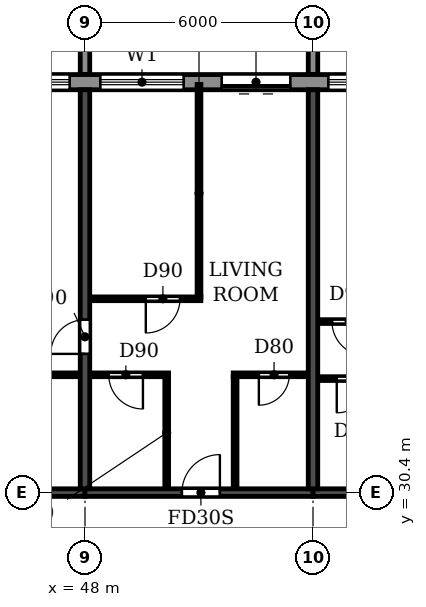
"""IFC4 building model, lengths in metres.
Left out: names, types, materials, properties, quantities, classifications, styles, units other than length and angle.
Written with IfcOpenShell. Run it as: python <this file> out.ifc"""

import sys

from ifc_helpers import new_model, si_unit, direction, frame, frame_2d, origin, place, context, subcontext, project, spatial, polyline, rectangle, outline, extrude, source, transform, mapped, element, fill, save


model = new_model("IFC4")
c1 = context("Model", 3, precision=1e-05, world=origin(), true_north=direction((0.0, 1.0)))
c2 = subcontext(c1, "Body", "Model", "MODEL_VIEW")
j1 = project(units=[si_unit("LENGTHUNIT", "METRE"), si_unit("PLANEANGLEUNIT", "RADIAN")], contexts=[c1])
p1 = place(None, origin())
s1 = spatial("IfcSite", under=j1, at=p1, CompositionType="ELEMENT")
p2 = place(p1, origin())
s2 = spatial("IfcBuilding", under=s1, at=p2, CompositionType="ELEMENT")
p3 = place(p2, frame((0.0, 0.0, 171.9)))
s3 = spatial("IfcBuildingStorey", under=s2, at=p3, CompositionType="ELEMENT", Elevation=171.9)
p4 = place(p3, frame((48.0, 30.5, 0.0), z_axis=(0.0, 0.0, 1.0), x_axis=(0.0, 1.0, 0.0)))
e1 = element("IfcWall", 1, at=p4, inside=s3, PredefinedType="SHEAR", context=c2, shape_type="SweptSolid", body=[
    extrude(rectangle(XDim=10.5, YDim=0.25, at=frame_2d((5.25, 0.0))), origin(), (0.0, 0.0, 1.0), 3.08),
])
p5 = place(p4, frame((3.55, 0.0, 0.0)))
e2 = element("IfcOpeningElement", 2, at=p5, cuts=e1, PredefinedType="OPENING", context=c2, shape_type="SweptSolid", body=[
    extrude(rectangle(XDim=0.9, YDim=2.1, at=frame_2d((0.45, 1.05))), frame((0.0, 0.135, 0.0), z_axis=(0.0, -1.0, 0.0), x_axis=(1.0, 0.0, 0.0)), (0.0, 0.0, 1.0), 0.27),
])
p6 = place(p3, frame((54.0, 30.5, 0.0), z_axis=(0.0, 0.0, 1.0), x_axis=(0.0, 1.0, 0.0)))
e3 = element("IfcWall", 3, at=p6, inside=s3, PredefinedType="SHEAR", context=c2, shape_type="SweptSolid", body=[
    extrude(rectangle(XDim=10.5, YDim=0.25, at=frame_2d((5.25, 0.0))), origin(), (0.0, 0.0, 1.0), 3.08),
])
p7 = place(p3, frame((42.0, 30.4, 0.0), z_axis=(0.0, 0.0, 1.0), x_axis=(1.0, 0.0, 0.0)))
e4 = element("IfcWall", 4, at=p7, inside=s3, PredefinedType="SHEAR", context=c2, shape_type="SweptSolid", body=[
    extrude(rectangle(XDim=6.0, YDim=0.2, at=frame_2d((3.0, 0.0))), origin(), (0.0, 0.0, 1.0), 2.48),
])
p8 = place(p3, frame((48.0, 30.4, 0.0), z_axis=(0.0, 0.0, 1.0), x_axis=(1.0, 0.0, 0.0)))
e5 = element("IfcWall", 5, at=p8, inside=s3, PredefinedType="SHEAR", context=c2, shape_type="SweptSolid", body=[
    extrude(rectangle(XDim=6.0, YDim=0.2, at=frame_2d((3.0, 0.0))), origin(), (0.0, 0.0, 1.0), 2.48),
])
p9 = place(p8, frame((2.55, 0.0, 0.0)))
e6 = element("IfcOpeningElement", 6, at=p9, cuts=e5, PredefinedType="OPENING", context=c2, shape_type="SweptSolid", body=[
    extrude(rectangle(XDim=1.0, YDim=2.1, at=frame_2d((0.5, 1.05))), frame((0.0, 0.11, 0.0), z_axis=(0.0, -1.0, 0.0), x_axis=(1.0, 0.0, 0.0)), (0.0, 0.0, 1.0), 0.22),
])
p10 = place(p3, frame((54.0, 30.4, 0.0), z_axis=(0.0, 0.0, 1.0), x_axis=(1.0, 0.0, 0.0)))
e7 = element("IfcWall", 7, at=p10, inside=s3, PredefinedType="SHEAR", context=c2, shape_type="SweptSolid", body=[
    extrude(rectangle(XDim=6.0, YDim=0.2, at=frame_2d((3.0, 0.0))), origin(), (0.0, 0.0, 1.0), 2.48),
])
p11 = place(p10, frame((2.55, 0.0, 0.0)))
e8 = element("IfcOpeningElement", 8, at=p11, cuts=e7, PredefinedType="OPENING", context=c2, shape_type="SweptSolid", body=[
    extrude(rectangle(XDim=1.0, YDim=2.1, at=frame_2d((0.5, 1.05))), frame((0.0, 0.11, 0.0), z_axis=(0.0, -1.0, 0.0), x_axis=(1.0, 0.0, 0.0)), (0.0, 0.0, 1.0), 0.22),
])
p12 = place(p3, frame((79.317, 41.2, 0.0), z_axis=(0.0, 0.0, 1.0), x_axis=(-1.0, 0.0, 0.0)))
e9 = element("IfcWall", 9, at=p12, inside=s3, PredefinedType="STANDARD", context=c2, shape_type="SweptSolid", body=[
    extrude(rectangle(XDim=56.634, YDim=0.4, at=frame_2d((28.317, 0.0))), origin(), (0.0, 0.0, 1.0), 3.08),
])
p13 = place(p12, frame((52.717, 0.0, 0.9)))
e10 = element("IfcOpeningElement", 10, at=p13, cuts=e9, PredefinedType="OPENING", context=c2, shape_type="SweptSolid", body=[
    extrude(rectangle(XDim=2.2, YDim=1.5, at=frame_2d((1.1, 0.75))), frame((0.0, 0.21, 0.0), z_axis=(0.0, -1.0, 0.0), x_axis=(1.0, 0.0, 0.0)), (0.0, 0.0, 1.0), 0.42),
])
p14 = place(p12, frame((49.917, 0.0, 0.0)))
e11 = element("IfcOpeningElement", 11, at=p14, cuts=e9, PredefinedType="OPENING", context=c2, shape_type="SweptSolid", body=[
    extrude(rectangle(XDim=1.8, YDim=2.4, at=frame_2d((0.9, 1.2))), frame((0.0, 0.21, 0.0), z_axis=(0.0, -1.0, 0.0), x_axis=(1.0, 0.0, 0.0)), (0.0, 0.0, 1.0), 0.42),
])
p15 = place(p12, frame((46.717, 0.0, 0.9)))
e12 = element("IfcOpeningElement", 12, at=p15, cuts=e9, PredefinedType="OPENING", context=c2, shape_type="SweptSolid", body=[
    extrude(rectangle(XDim=2.2, YDim=1.5, at=frame_2d((1.1, 0.75))), frame((0.0, 0.21, 0.0), z_axis=(0.0, -1.0, 0.0), x_axis=(1.0, 0.0, 0.0)), (0.0, 0.0, 1.0), 0.42),
])
p16 = place(p12, frame((43.717, 0.0, 0.9)))
e13 = element("IfcOpeningElement", 13, at=p16, cuts=e9, PredefinedType="OPENING", context=c2, shape_type="SweptSolid", body=[
    extrude(rectangle(XDim=2.2, YDim=1.5, at=frame_2d((1.1, 0.75))), frame((0.0, 0.21, 0.0), z_axis=(0.0, -1.0, 0.0), x_axis=(1.0, 0.0, 0.0)), (0.0, 0.0, 1.0), 0.42),
])
p17 = place(p12, frame((40.917, 0.0, 0.0)))
e14 = element("IfcOpeningElement", 14, at=p17, cuts=e9, PredefinedType="OPENING", context=c2, shape_type="SweptSolid", body=[
    extrude(rectangle(XDim=1.8, YDim=2.4, at=frame_2d((0.9, 1.2))), frame((0.0, 0.21, 0.0), z_axis=(0.0, -1.0, 0.0), x_axis=(1.0, 0.0, 0.0)), (0.0, 0.0, 1.0), 0.42),
])
p18 = place(p12, frame((37.717, 0.0, 0.9)))
e15 = element("IfcOpeningElement", 15, at=p18, cuts=e9, PredefinedType="OPENING", context=c2, shape_type="SweptSolid", body=[
    extrude(rectangle(XDim=2.2, YDim=1.5, at=frame_2d((1.1, 0.75))), frame((0.0, 0.21, 0.0), z_axis=(0.0, -1.0, 0.0), x_axis=(1.0, 0.0, 0.0)), (0.0, 0.0, 1.0), 0.42),
])
p19 = place(p12, frame((34.717, 0.0, 0.9)))
e16 = element("IfcOpeningElement", 16, at=p19, cuts=e9, PredefinedType="OPENING", context=c2, shape_type="SweptSolid", body=[
    extrude(rectangle(XDim=2.2, YDim=1.5, at=frame_2d((1.1, 0.75))), frame((0.0, 0.21, 0.0), z_axis=(0.0, -1.0, 0.0), x_axis=(1.0, 0.0, 0.0)), (0.0, 0.0, 1.0), 0.42),
])
p20 = place(p12, frame((31.717, 0.0, 0.9)))
e17 = element("IfcOpeningElement", 17, at=p20, cuts=e9, PredefinedType="OPENING", context=c2, shape_type="SweptSolid", body=[
    extrude(rectangle(XDim=2.2, YDim=1.5, at=frame_2d((1.1, 0.75))), frame((0.0, 0.21, 0.0), z_axis=(0.0, -1.0, 0.0), x_axis=(1.0, 0.0, 0.0)), (0.0, 0.0, 1.0), 0.42),
])
p21 = place(p12, frame((28.717, 0.0, 0.9)))
e18 = element("IfcOpeningElement", 18, at=p21, cuts=e9, PredefinedType="OPENING", context=c2, shape_type="SweptSolid", body=[
    extrude(rectangle(XDim=2.2, YDim=1.5, at=frame_2d((1.1, 0.75))), frame((0.0, 0.21, 0.0), z_axis=(0.0, -1.0, 0.0), x_axis=(1.0, 0.0, 0.0)), (0.0, 0.0, 1.0), 0.42),
])
p22 = place(p12, frame((25.917, 0.0, 0.0)))
e19 = element("IfcOpeningElement", 19, at=p22, cuts=e9, PredefinedType="OPENING", context=c2, shape_type="SweptSolid", body=[
    extrude(rectangle(XDim=1.8, YDim=2.4, at=frame_2d((0.9, 1.2))), frame((0.0, 0.21, 0.0), z_axis=(0.0, -1.0, 0.0), x_axis=(1.0, 0.0, 0.0)), (0.0, 0.0, 1.0), 0.42),
])
p23 = place(p12, frame((22.717, 0.0, 0.9)))
e20 = element("IfcOpeningElement", 20, at=p23, cuts=e9, PredefinedType="OPENING", context=c2, shape_type="SweptSolid", body=[
    extrude(rectangle(XDim=2.2, YDim=1.5, at=frame_2d((1.1, 0.75))), frame((0.0, 0.21, 0.0), z_axis=(0.0, -1.0, 0.0), x_axis=(1.0, 0.0, 0.0)), (0.0, 0.0, 1.0), 0.42),
])
p24 = place(p12, frame((19.917, 0.0, 0.0)))
e21 = element("IfcOpeningElement", 21, at=p24, cuts=e9, PredefinedType="OPENING", context=c2, shape_type="SweptSolid", body=[
    extrude(rectangle(XDim=1.8, YDim=2.4, at=frame_2d((0.9, 1.2))), frame((0.0, 0.21, 0.0), z_axis=(0.0, -1.0, 0.0), x_axis=(1.0, 0.0, 0.0)), (0.0, 0.0, 1.0), 0.42),
])
p25 = place(p12, frame((16.717, 0.0, 0.9)))
e22 = element("IfcOpeningElement", 22, at=p25, cuts=e9, PredefinedType="OPENING", context=c2, shape_type="SweptSolid", body=[
    extrude(rectangle(XDim=2.2, YDim=1.5, at=frame_2d((1.1, 0.75))), frame((0.0, 0.21, 0.0), z_axis=(0.0, -1.0, 0.0), x_axis=(1.0, 0.0, 0.0)), (0.0, 0.0, 1.0), 0.42),
])
p26 = place(p12, frame((13.717, 0.0, 0.9)))
e23 = element("IfcOpeningElement", 23, at=p26, cuts=e9, PredefinedType="OPENING", context=c2, shape_type="SweptSolid", body=[
    extrude(rectangle(XDim=2.2, YDim=1.5, at=frame_2d((1.1, 0.75))), frame((0.0, 0.21, 0.0), z_axis=(0.0, -1.0, 0.0), x_axis=(1.0, 0.0, 0.0)), (0.0, 0.0, 1.0), 0.42),
])
p27 = place(p12, frame((10.917, 0.0, 0.0)))
e24 = element("IfcOpeningElement", 24, at=p27, cuts=e9, PredefinedType="OPENING", context=c2, shape_type="SweptSolid", body=[
    extrude(rectangle(XDim=1.8, YDim=2.4, at=frame_2d((0.9, 1.2))), frame((0.0, 0.21, 0.0), z_axis=(0.0, -1.0, 0.0), x_axis=(1.0, 0.0, 0.0)), (0.0, 0.0, 1.0), 0.42),
])
p28 = place(p12, frame((7.717, 0.0, 0.9)))
e25 = element("IfcOpeningElement", 25, at=p28, cuts=e9, PredefinedType="OPENING", context=c2, shape_type="SweptSolid", body=[
    extrude(rectangle(XDim=2.2, YDim=1.5, at=frame_2d((1.1, 0.75))), frame((0.0, 0.21, 0.0), z_axis=(0.0, -1.0, 0.0), x_axis=(1.0, 0.0, 0.0)), (0.0, 0.0, 1.0), 0.42),
])
p29 = place(p12, frame((4.717, 0.0, 0.9)))
e26 = element("IfcOpeningElement", 26, at=p29, cuts=e9, PredefinedType="OPENING", context=c2, shape_type="SweptSolid", body=[
    extrude(rectangle(XDim=2.2, YDim=1.5, at=frame_2d((1.1, 0.75))), frame((0.0, 0.21, 0.0), z_axis=(0.0, -1.0, 0.0), x_axis=(1.0, 0.0, 0.0)), (0.0, 0.0, 1.0), 0.42),
])
p30 = place(p12, frame((1.917, 0.0, 0.0)))
e27 = element("IfcOpeningElement", 27, at=p30, cuts=e9, PredefinedType="OPENING", context=c2, shape_type="SweptSolid", body=[
    extrude(rectangle(XDim=1.8, YDim=2.4, at=frame_2d((0.9, 1.2))), frame((0.0, 0.21, 0.0), z_axis=(0.0, -1.0, 0.0), x_axis=(1.0, 0.0, 0.0)), (0.0, 0.0, 1.0), 0.42),
])
m1 = source(origin(), c2, "Body", "SweptSolid", [
    extrude(outline(polyline([(0.0, 0.0), (0.25, 0.0), (0.25, 3.1), (0.0, 3.1), (0.0, 0.0)])), origin(), (0.0, 0.0, 1.0), 3.1),
])
for number, where in (
    (28, (47.875, 41.4, 0.0)),
    (29, (53.875, 41.4, 0.0)),
):
    element("IfcWall", number, at=place(p3, frame(where)), inside=s3, PredefinedType="STANDARD", context=c2, shape_type="MappedRepresentation", body=[
        mapped(m1, transform((0.0, 0.0, 0.0))),
    ])
p31 = place(p3, frame((54.135, 33.4, 0.0), z_axis=(0.0, 0.0, 1.0), x_axis=(1.0, 0.0, 0.0)))
e30 = element("IfcWall", 30, at=p31, inside=s3, PredefinedType="PARTITIONING", context=c2, shape_type="SweptSolid", body=[
    extrude(rectangle(XDim=2.065, YDim=0.1, at=frame_2d((1.032, 0.0))), origin(), (0.0, 0.0, 1.0), 3.08),
])
p32 = place(p31, frame((0.49, 0.0, 0.0)))
e31 = element("IfcOpeningElement", 31, at=p32, cuts=e30, PredefinedType="OPENING", context=c2, shape_type="SweptSolid", body=[
    extrude(rectangle(XDim=0.9, YDim=2.1, at=frame_2d((0.45, 1.05))), frame((0.0, 0.06, 0.0), z_axis=(0.0, -1.0, 0.0), x_axis=(1.0, 0.0, 0.0)), (0.0, 0.0, 1.0), 0.12),
])
p33 = place(p3, frame((45.1, 33.5, 0.0), z_axis=(0.0, 0.0, 1.0), x_axis=(1.0, 0.0, 0.0)))
e32 = element("IfcWall", 32, at=p33, inside=s3, PredefinedType="PARTITIONING", context=c2, shape_type="SweptSolid", body=[
    extrude(rectangle(XDim=2.765, YDim=0.1, at=frame_2d((1.382, 0.0))), origin(), (0.0, 0.0, 1.0), 3.08),
])
p34 = place(p33, frame((1.0, 0.0, 0.0)))
e33 = element("IfcOpeningElement", 33, at=p34, cuts=e32, PredefinedType="OPENING", context=c2, shape_type="SweptSolid", body=[
    extrude(rectangle(XDim=0.8, YDim=2.1, at=frame_2d((0.4, 1.05))), frame((0.0, 0.06, 0.0), z_axis=(0.0, -1.0, 0.0), x_axis=(1.0, 0.0, 0.0)), (0.0, 0.0, 1.0), 0.12),
])
p35 = place(p3, frame((48.135, 33.5, 0.0), z_axis=(0.0, 0.0, 1.0), x_axis=(1.0, 0.0, 0.0)))
e34 = element("IfcWall", 34, at=p35, inside=s3, PredefinedType="PARTITIONING", context=c2, shape_type="SweptSolid", body=[
    extrude(rectangle(XDim=2.065, YDim=0.1, at=frame_2d((1.032, 0.0))), origin(), (0.0, 0.0, 1.0), 3.08),
])
p36 = place(p35, frame((0.49, 0.0, 0.0)))
e35 = element("IfcOpeningElement", 35, at=p36, cuts=e34, PredefinedType="OPENING", context=c2, shape_type="SweptSolid", body=[
    extrude(rectangle(XDim=0.9, YDim=2.1, at=frame_2d((0.45, 1.05))), frame((0.0, 0.06, 0.0), z_axis=(0.0, -1.0, 0.0), x_axis=(1.0, 0.0, 0.0)), (0.0, 0.0, 1.0), 0.12),
])
p37 = place(p3, frame((51.9, 33.5, 0.0), z_axis=(0.0, 0.0, 1.0), x_axis=(1.0, 0.0, 0.0)))
e36 = element("IfcWall", 36, at=p37, inside=s3, PredefinedType="PARTITIONING", context=c2, shape_type="SweptSolid", body=[
    extrude(rectangle(XDim=1.965, YDim=0.1, at=frame_2d((0.982, 0.0))), origin(), (0.0, 0.0, 1.0), 3.08),
])
p38 = place(p37, frame((0.675, 0.0, 0.0)))
e37 = element("IfcOpeningElement", 37, at=p38, cuts=e36, PredefinedType="OPENING", context=c2, shape_type="SweptSolid", body=[
    extrude(rectangle(XDim=0.8, YDim=2.1, at=frame_2d((0.4, 1.05))), frame((0.0, 0.06, 0.0), z_axis=(0.0, -1.0, 0.0), x_axis=(1.0, 0.0, 0.0)), (0.0, 0.0, 1.0), 0.12),
])
p39 = place(p3, frame((54.135, 34.9, 0.0), z_axis=(0.0, 0.0, 1.0), x_axis=(1.0, 0.0, 0.0)))
e38 = element("IfcWall", 38, at=p39, inside=s3, PredefinedType="PARTITIONING", context=c2, shape_type="SweptSolid", body=[
    extrude(rectangle(XDim=2.915, YDim=0.1, at=frame_2d((1.458, 0.0))), origin(), (0.0, 0.0, 1.0), 3.08),
])
p40 = place(p39, frame((0.365, 0.0, 0.0)))
e39 = element("IfcOpeningElement", 39, at=p40, cuts=e38, PredefinedType="OPENING", context=c2, shape_type="SweptSolid", body=[
    extrude(rectangle(XDim=0.9, YDim=2.1, at=frame_2d((0.45, 1.05))), frame((0.0, 0.06, 0.0), z_axis=(0.0, -1.0, 0.0), x_axis=(1.0, 0.0, 0.0)), (0.0, 0.0, 1.0), 0.12),
])
p41 = place(p3, frame((48.135, 35.5, 0.0), z_axis=(0.0, 0.0, 1.0), x_axis=(1.0, 0.0, 0.0)))
e40 = element("IfcWall", 40, at=p41, inside=s3, PredefinedType="PARTITIONING", context=c2, shape_type="SweptSolid", body=[
    extrude(rectangle(XDim=2.915, YDim=0.1, at=frame_2d((1.458, 0.0))), origin(), (0.0, 0.0, 1.0), 3.08),
])
p42 = place(p41, frame((1.465, 0.0, 0.0)))
e41 = element("IfcOpeningElement", 41, at=p42, cuts=e40, PredefinedType="OPENING", context=c2, shape_type="SweptSolid", body=[
    extrude(rectangle(XDim=0.9, YDim=2.1, at=frame_2d((0.45, 1.05))), frame((0.0, 0.06, 0.0), z_axis=(0.0, -1.0, 0.0), x_axis=(1.0, 0.0, 0.0)), (0.0, 0.0, 1.0), 0.12),
])
p43 = place(p3, frame((50.15, 30.51, 0.0), z_axis=(0.0, 0.0, 1.0), x_axis=(0.0, 1.0, 0.0)))
e42 = element("IfcWall", 42, at=p43, inside=s3, PredefinedType="PARTITIONING", context=c2, shape_type="SweptSolid", body=[
    extrude(rectangle(XDim=2.94, YDim=0.1, at=frame_2d((1.47, 0.0))), origin(), (0.0, 0.0, 1.0), 3.08),
])
p44 = place(p3, frame((51.0, 35.55, 0.0), z_axis=(0.0, 0.0, 1.0), x_axis=(0.0, 1.0, 0.0)))
e43 = element("IfcWall", 43, at=p44, inside=s3, PredefinedType="PARTITIONING", context=c2, shape_type="SweptSolid", body=[
    extrude(rectangle(XDim=5.59, YDim=0.1, at=frame_2d((2.795, 0.0))), origin(), (0.0, 0.0, 1.0), 3.08),
])
p45 = place(p3, frame((51.95, 30.51, 0.0), z_axis=(0.0, 0.0, 1.0), x_axis=(0.0, 1.0, 0.0)))
e44 = element("IfcWall", 44, at=p45, inside=s3, PredefinedType="PARTITIONING", context=c2, shape_type="SweptSolid", body=[
    extrude(rectangle(XDim=2.94, YDim=0.1, at=frame_2d((1.47, 0.0))), origin(), (0.0, 0.0, 1.0), 3.08),
])
p46 = place(p20, origin())
e45 = element("IfcWindow", 45, at=p46, inside=s3, PartitioningType="DOUBLE_PANEL_HORIZONTAL", PredefinedType="WINDOW", context=c2, shape_type="SweptSolid", body=[
    extrude(rectangle(XDim=2.2, YDim=1.5, at=frame_2d((1.1, 0.75))), frame((0.0, 0.03, 0.0), z_axis=(0.0, -1.0, 0.0), x_axis=(1.0, 0.0, 0.0)), (0.0, 0.0, 1.0), 0.06),
])
fill(e17, e45)
p47 = place(p21, origin())
e46 = element("IfcWindow", 46, at=p47, inside=s3, PartitioningType="DOUBLE_PANEL_HORIZONTAL", PredefinedType="WINDOW", context=c2, shape_type="SweptSolid", body=[
    extrude(rectangle(XDim=2.2, YDim=1.5, at=frame_2d((1.1, 0.75))), frame((0.0, 0.03, 0.0), z_axis=(0.0, -1.0, 0.0), x_axis=(1.0, 0.0, 0.0)), (0.0, 0.0, 1.0), 0.06),
])
fill(e18, e46)
p48 = place(p22, origin())
e47 = element("IfcDoor", 47, at=p48, inside=s3, OperationType="DOUBLE_DOOR_SLIDING", PredefinedType="DOOR", context=c2, shape_type="SweptSolid", body=[
    extrude(rectangle(XDim=1.8, YDim=2.4, at=frame_2d((0.9, 1.2))), frame((0.0, 0.025, 0.0), z_axis=(0.0, -1.0, 0.0), x_axis=(1.0, 0.0, 0.0)), (0.0, 0.0, 1.0), 0.05),
])
fill(e19, e47)
p49 = place(p23, origin())
e48 = element("IfcWindow", 48, at=p49, inside=s3, PartitioningType="DOUBLE_PANEL_HORIZONTAL", PredefinedType="WINDOW", context=c2, shape_type="SweptSolid", body=[
    extrude(rectangle(XDim=2.2, YDim=1.5, at=frame_2d((1.1, 0.75))), frame((0.0, 0.03, 0.0), z_axis=(0.0, -1.0, 0.0), x_axis=(1.0, 0.0, 0.0)), (0.0, 0.0, 1.0), 0.06),
])
fill(e20, e48)
p50 = place(p5, origin())
e49 = element("IfcDoor", 49, at=p50, inside=s3, OperationType="SINGLE_SWING_LEFT", PredefinedType="DOOR", context=c2, shape_type="SweptSolid", body=[
    extrude(rectangle(XDim=0.9, YDim=2.1, at=frame_2d((0.45, 1.05))), frame((0.0, 0.025, 0.0), z_axis=(0.0, -1.0, 0.0), x_axis=(1.0, 0.0, 0.0)), (0.0, 0.0, 1.0), 0.05),
])
fill(e2, e49)
p51 = place(p36, frame((0.9, 0.0, 0.0), z_axis=(0.0, 0.0, 1.0), x_axis=(-1.0, 0.0, 0.0)))
e50 = element("IfcDoor", 50, at=p51, inside=s3, OperationType="SINGLE_SWING_LEFT", PredefinedType="DOOR", context=c2, shape_type="SweptSolid", body=[
    extrude(rectangle(XDim=0.9, YDim=2.1, at=frame_2d((0.45, 1.05))), frame((0.0, 0.025, 0.0), z_axis=(0.0, -1.0, 0.0), x_axis=(1.0, 0.0, 0.0)), (0.0, 0.0, 1.0), 0.05),
])
fill(e35, e50)
p52 = place(p42, frame((0.9, 0.0, 0.0), z_axis=(0.0, 0.0, 1.0), x_axis=(-1.0, 0.0, 0.0)))
e51 = element("IfcDoor", 51, at=p52, inside=s3, OperationType="SINGLE_SWING_RIGHT", PredefinedType="DOOR", context=c2, shape_type="SweptSolid", body=[
    extrude(rectangle(XDim=0.9, YDim=2.1, at=frame_2d((0.45, 1.05))), frame((0.0, 0.025, 0.0), z_axis=(0.0, -1.0, 0.0), x_axis=(1.0, 0.0, 0.0)), (0.0, 0.0, 1.0), 0.05),
])
fill(e41, e51)
p53 = place(p9, origin())
e52 = element("IfcDoor", 52, at=p53, inside=s3, OperationType="SINGLE_SWING_RIGHT", PredefinedType="DOOR", context=c2, shape_type="SweptSolid", body=[
    extrude(rectangle(XDim=1.0, YDim=2.1, at=frame_2d((0.5, 1.05))), frame((0.0, 0.025, 0.0), z_axis=(0.0, -1.0, 0.0), x_axis=(1.0, 0.0, 0.0)), (0.0, 0.0, 1.0), 0.05),
])
fill(e6, e52)
p54 = place(p38, frame((0.8, 0.0, 0.0), z_axis=(0.0, 0.0, 1.0), x_axis=(-1.0, 0.0, 0.0)))
e53 = element("IfcDoor", 53, at=p54, inside=s3, OperationType="SINGLE_SWING_RIGHT", PredefinedType="DOOR", context=c2, shape_type="SweptSolid", body=[
    extrude(rectangle(XDim=0.8, YDim=2.1, at=frame_2d((0.4, 1.05))), frame((0.0, 0.025, 0.0), z_axis=(0.0, -1.0, 0.0), x_axis=(1.0, 0.0, 0.0)), (0.0, 0.0, 1.0), 0.05),
])
fill(e37, e53)
p55 = place(p40, frame((0.9, 0.0, 0.0), z_axis=(0.0, 0.0, 1.0), x_axis=(-1.0, 0.0, 0.0)))
e54 = element("IfcDoor", 54, at=p55, inside=s3, OperationType="SINGLE_SWING_LEFT", PredefinedType="DOOR", context=c2, shape_type="SweptSolid", body=[
    extrude(rectangle(XDim=0.9, YDim=2.1, at=frame_2d((0.45, 1.05))), frame((0.0, 0.025, 0.0), z_axis=(0.0, -1.0, 0.0), x_axis=(1.0, 0.0, 0.0)), (0.0, 0.0, 1.0), 0.05),
])
fill(e39, e54)
p56 = place(p32, frame((0.9, 0.0, 0.0), z_axis=(0.0, 0.0, 1.0), x_axis=(-1.0, 0.0, 0.0)))
e55 = element("IfcDoor", 55, at=p56, inside=s3, OperationType="SINGLE_SWING_RIGHT", PredefinedType="DOOR", context=c2, shape_type="SweptSolid", body=[
    extrude(rectangle(XDim=0.9, YDim=2.1, at=frame_2d((0.45, 1.05))), frame((0.0, 0.025, 0.0), z_axis=(0.0, -1.0, 0.0), x_axis=(1.0, 0.0, 0.0)), (0.0, 0.0, 1.0), 0.05),
])
fill(e31, e55)
save(model, sys.argv[1])
